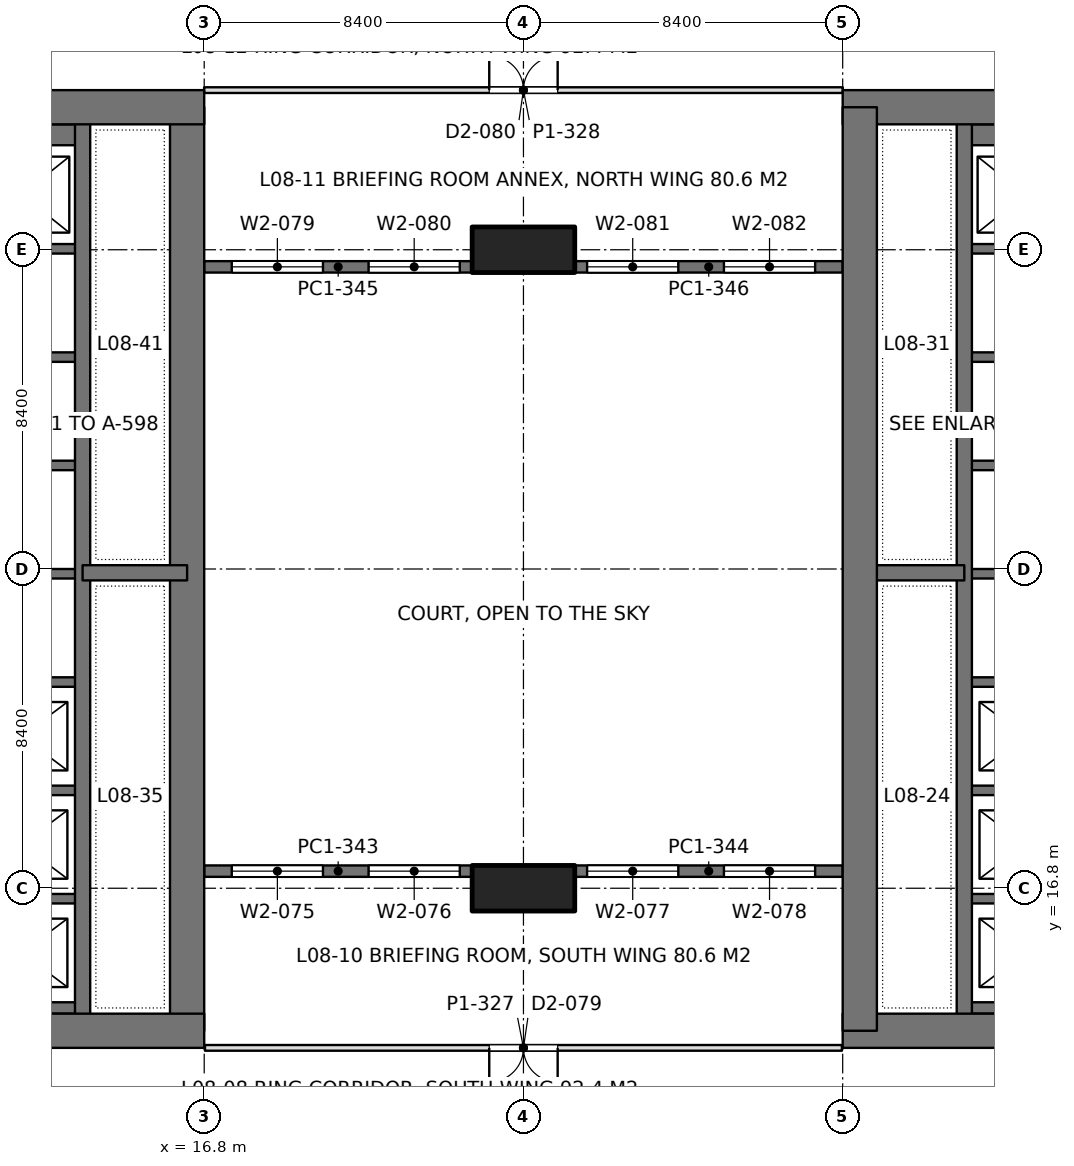
"""IFC4 building model, lengths in metres.
Left out: names, types, materials, properties, quantities, classifications, styles, units other than length and angle.
Written with IfcOpenShell. Run it as: python <this file> out.ifc"""

import sys

from ifc_helpers import new_model, si_unit, direction, frame, frame_2d, origin, origin_2d, place, context, subcontext, project, spatial, rectangle, extrude, element, fill, save


model = new_model("IFC4")
c1 = context("Model", 3, precision=1e-05, world=origin(), true_north=direction((0.0, 1.0)))
c2 = subcontext(c1, "Body", "Model", "MODEL_VIEW")
j1 = project(units=[si_unit("LENGTHUNIT", "METRE"), si_unit("PLANEANGLEUNIT", "RADIAN")], contexts=[c1])
p1 = place(None, origin())
s1 = spatial("IfcSite", under=j1, at=p1, CompositionType="ELEMENT")
p2 = place(p1, origin())
s2 = spatial("IfcBuilding", under=s1, at=p2, CompositionType="ELEMENT")
p3 = place(p2, frame((0.0, 0.0, 36.9)))
s3 = spatial("IfcBuildingStorey", under=s2, at=p3, CompositionType="ELEMENT", Elevation=36.9)
for number, where, z_axis, x_axis in (
    (1, (25.2, 16.8, 0.0), (0.0, 0.0, 1.0), (1.0, 0.0, 0.0)),
    (2, (25.2, 33.6, 0.0), (0.0, 0.0, 1.0), (1.0, 0.0, 0.0)),
):
    element("IfcColumn", number, at=place(p3, frame(where, z_axis=z_axis, x_axis=x_axis)), inside=s3, PredefinedType="COLUMN", context=c2, shape_type="SweptSolid", body=[
        extrude(rectangle(XDim=2.7, YDim=1.2, at=origin_2d()), origin(), (0.0, 0.0, 1.0), 4.5),
    ])
p4 = place(p3, frame((-1.2, 13.05, 0.0), z_axis=(0.0, 0.0, 1.0), x_axis=(1.0, 0.0, 0.0)))
e3 = element("IfcWall", 3, at=p4, inside=s3, PredefinedType="SHEAR", context=c2, shape_type="SweptSolid", body=[
    extrude(rectangle(XDim=18.0, YDim=0.9, at=frame_2d((9.0, 0.0))), origin(), (0.0, 0.0, 1.0), 4.5),
])
p5 = place(p4, frame((8.95, 0.0, 0.0)))
e4 = element("IfcOpeningElement", 4, at=p5, cuts=e3, PredefinedType="OPENING", context=c2, shape_type="SweptSolid", body=[
    extrude(rectangle(XDim=1.8, YDim=2.4, at=frame_2d((0.9, 1.2))), frame((0.0, 0.46, 0.0), z_axis=(0.0, -1.0, 0.0), x_axis=(1.0, 0.0, 0.0)), (0.0, 0.0, 1.0), 0.92),
])
p6 = place(p3, frame((-1.2, 37.35, 0.0), z_axis=(0.0, 0.0, 1.0), x_axis=(1.0, 0.0, 0.0)))
e5 = element("IfcWall", 5, at=p6, inside=s3, PredefinedType="SHEAR", context=c2, shape_type="SweptSolid", body=[
    extrude(rectangle(XDim=18.0, YDim=0.9, at=frame_2d((9.0, 0.0))), origin(), (0.0, 0.0, 1.0), 4.5),
])
p7 = place(p6, frame((8.95, 0.0, 0.0)))
e6 = element("IfcOpeningElement", 6, at=p7, cuts=e5, PredefinedType="OPENING", context=c2, shape_type="SweptSolid", body=[
    extrude(rectangle(XDim=1.8, YDim=2.4, at=frame_2d((0.9, 1.2))), frame((0.0, 0.46, 0.0), z_axis=(0.0, -1.0, 0.0), x_axis=(1.0, 0.0, 0.0)), (0.0, 0.0, 1.0), 0.92),
])
p8 = place(p3, frame((16.35, 13.05, 0.0), z_axis=(0.0, 0.0, 1.0), x_axis=(0.0, 1.0, 0.0)))
e7 = element("IfcWall", 7, at=p8, inside=s3, PredefinedType="SHEAR", context=c2, shape_type="SweptSolid", body=[
    extrude(rectangle(XDim=24.3, YDim=0.9, at=frame_2d((12.15, 0.0))), origin(), (0.0, 0.0, 1.0), 4.5),
])
p9 = place(p3, frame((13.6, 13.05, 0.0), z_axis=(0.0, 0.0, 1.0), x_axis=(0.0, 1.0, 0.0)))
e8 = element("IfcWall", 8, at=p9, inside=s3, PredefinedType="SHEAR", context=c2, shape_type="SweptSolid", body=[
    extrude(rectangle(XDim=24.3, YDim=0.4, at=frame_2d((12.15, 0.0))), origin(), (0.0, 0.0, 1.0), 4.5),
])
p10 = place(p3, frame((13.6, 25.1, 0.0), z_axis=(0.0, 0.0, 1.0), x_axis=(1.0, 0.0, 0.0)))
e9 = element("IfcWall", 9, at=p10, inside=s3, PredefinedType="SHEAR", context=c2, shape_type="SweptSolid", body=[
    extrude(rectangle(XDim=2.75, YDim=0.4, at=frame_2d((1.375, 0.0))), origin(), (0.0, 0.0, 1.0), 4.5),
])
p11 = place(p3, frame((10.4, 13.65, 0.0), z_axis=(0.0, 0.0, 1.0), x_axis=(1.0, 0.0, 0.0)))
e10 = element("IfcWall", 10, at=p11, inside=s3, PredefinedType="SHEAR", context=c2, shape_type="SweptSolid", body=[
    extrude(rectangle(XDim=3.2, YDim=0.3, at=frame_2d((1.6, 0.0))), origin(), (0.0, 0.0, 1.0), 4.5),
])
for number, where, z_axis, x_axis in (
    (11, (10.4, 16.525, 0.0), (0.0, 0.0, 1.0), (1.0, 0.0, 0.0)),
    (12, (10.4, 19.375, 0.0), (0.0, 0.0, 1.0), (1.0, 0.0, 0.0)),
    (13, (10.4, 22.225, 0.0), (0.0, 0.0, 1.0), (1.0, 0.0, 0.0)),
    (14, (10.4, 25.075, 0.0), (0.0, 0.0, 1.0), (1.0, 0.0, 0.0)),
    (15, (10.4, 27.925, 0.0), (0.0, 0.0, 1.0), (1.0, 0.0, 0.0)),
    (16, (10.4, 30.775, 0.0), (0.0, 0.0, 1.0), (1.0, 0.0, 0.0)),
    (17, (10.4, 33.625, 0.0), (0.0, 0.0, 1.0), (1.0, 0.0, 0.0)),
):
    element("IfcWall", number, at=place(p3, frame(where, z_axis=z_axis, x_axis=x_axis)), inside=s3, PredefinedType="SHEAR", context=c2, shape_type="SweptSolid", body=[
        extrude(rectangle(XDim=3.2, YDim=0.25, at=frame_2d((1.6, 0.0))), origin(), (0.0, 0.0, 1.0), 4.5),
    ])
p12 = place(p3, frame((10.4, 36.625, 0.0), z_axis=(0.0, 0.0, 1.0), x_axis=(1.0, 0.0, 0.0)))
e18 = element("IfcWall", 18, at=p12, inside=s3, PredefinedType="SHEAR", context=c2, shape_type="SweptSolid", body=[
    extrude(rectangle(XDim=3.2, YDim=0.55, at=frame_2d((1.6, 0.0))), origin(), (0.0, 0.0, 1.0), 4.5),
])
p13 = place(p3, frame((33.6, 13.05, 0.0), z_axis=(0.0, 0.0, 1.0), x_axis=(1.0, 0.0, 0.0)))
e19 = element("IfcWall", 19, at=p13, inside=s3, PredefinedType="SHEAR", context=c2, shape_type="SweptSolid", body=[
    extrude(rectangle(XDim=18.0, YDim=0.9, at=frame_2d((9.0, 0.0))), origin(), (0.0, 0.0, 1.0), 4.5),
])
p14 = place(p13, frame((7.25, 0.0, 0.0)))
e20 = element("IfcOpeningElement", 20, at=p14, cuts=e19, PredefinedType="OPENING", context=c2, shape_type="SweptSolid", body=[
    extrude(rectangle(XDim=1.8, YDim=2.4, at=frame_2d((0.9, 1.2))), frame((0.0, 0.46, 0.0), z_axis=(0.0, -1.0, 0.0), x_axis=(1.0, 0.0, 0.0)), (0.0, 0.0, 1.0), 0.92),
])
p15 = place(p3, frame((33.6, 37.35, 0.0), z_axis=(0.0, 0.0, 1.0), x_axis=(1.0, 0.0, 0.0)))
e21 = element("IfcWall", 21, at=p15, inside=s3, PredefinedType="SHEAR", context=c2, shape_type="SweptSolid", body=[
    extrude(rectangle(XDim=18.0, YDim=0.9, at=frame_2d((9.0, 0.0))), origin(), (0.0, 0.0, 1.0), 4.5),
])
p16 = place(p15, frame((7.25, 0.0, 0.0)))
e22 = element("IfcOpeningElement", 22, at=p16, cuts=e21, PredefinedType="OPENING", context=c2, shape_type="SweptSolid", body=[
    extrude(rectangle(XDim=1.8, YDim=2.4, at=frame_2d((0.9, 1.2))), frame((0.0, 0.46, 0.0), z_axis=(0.0, -1.0, 0.0), x_axis=(1.0, 0.0, 0.0)), (0.0, 0.0, 1.0), 0.92),
])
p17 = place(p3, frame((34.05, 13.05, 0.0), z_axis=(0.0, 0.0, 1.0), x_axis=(0.0, 1.0, 0.0)))
e23 = element("IfcWall", 23, at=p17, inside=s3, PredefinedType="SHEAR", context=c2, shape_type="SweptSolid", body=[
    extrude(rectangle(XDim=24.3, YDim=0.9, at=frame_2d((12.15, 0.0))), origin(), (0.0, 0.0, 1.0), 4.5),
])
p18 = place(p3, frame((36.8, 13.05, 0.0), z_axis=(0.0, 0.0, 1.0), x_axis=(0.0, 1.0, 0.0)))
e24 = element("IfcWall", 24, at=p18, inside=s3, PredefinedType="SHEAR", context=c2, shape_type="SweptSolid", body=[
    extrude(rectangle(XDim=24.3, YDim=0.4, at=frame_2d((12.15, 0.0))), origin(), (0.0, 0.0, 1.0), 4.5),
])
p19 = place(p3, frame((36.8, 25.1, 0.0), z_axis=(0.0, 0.0, 1.0), x_axis=(-1.0, 0.0, 0.0)))
e25 = element("IfcWall", 25, at=p19, inside=s3, PredefinedType="SHEAR", context=c2, shape_type="SweptSolid", body=[
    extrude(rectangle(XDim=2.75, YDim=0.4, at=frame_2d((1.375, 0.0))), origin(), (0.0, 0.0, 1.0), 4.5),
])
p20 = place(p3, frame((40.0, 13.65, 0.0), z_axis=(0.0, 0.0, 1.0), x_axis=(-1.0, 0.0, 0.0)))
e26 = element("IfcWall", 26, at=p20, inside=s3, PredefinedType="SHEAR", context=c2, shape_type="SweptSolid", body=[
    extrude(rectangle(XDim=3.2, YDim=0.3, at=frame_2d((1.6, 0.0))), origin(), (0.0, 0.0, 1.0), 4.5),
])
for number, where, z_axis, x_axis in (
    (27, (40.0, 16.525, 0.0), (0.0, 0.0, 1.0), (-1.0, 0.0, 0.0)),
    (28, (40.0, 19.375, 0.0), (0.0, 0.0, 1.0), (-1.0, 0.0, 0.0)),
    (29, (40.0, 22.225, 0.0), (0.0, 0.0, 1.0), (-1.0, 0.0, 0.0)),
    (30, (40.0, 25.075, 0.0), (0.0, 0.0, 1.0), (-1.0, 0.0, 0.0)),
    (31, (40.0, 27.925, 0.0), (0.0, 0.0, 1.0), (-1.0, 0.0, 0.0)),
    (32, (40.0, 30.775, 0.0), (0.0, 0.0, 1.0), (-1.0, 0.0, 0.0)),
    (33, (40.0, 33.625, 0.0), (0.0, 0.0, 1.0), (-1.0, 0.0, 0.0)),
):
    element("IfcWall", number, at=place(p3, frame(where, z_axis=z_axis, x_axis=x_axis)), inside=s3, PredefinedType="SHEAR", context=c2, shape_type="SweptSolid", body=[
        extrude(rectangle(XDim=3.2, YDim=0.25, at=frame_2d((1.6, 0.0))), origin(), (0.0, 0.0, 1.0), 4.5),
    ])
p21 = place(p3, frame((40.0, 36.625, 0.0), z_axis=(0.0, 0.0, 1.0), x_axis=(-1.0, 0.0, 0.0)))
e34 = element("IfcWall", 34, at=p21, inside=s3, PredefinedType="SHEAR", context=c2, shape_type="SweptSolid", body=[
    extrude(rectangle(XDim=3.2, YDim=0.55, at=frame_2d((1.6, 0.0))), origin(), (0.0, 0.0, 1.0), 4.5),
])
p22 = place(p3, frame((16.8, 17.25, 0.0), z_axis=(0.0, 0.0, 1.0), x_axis=(1.0, 0.0, 0.0)))
e35 = element("IfcWall", 35, at=p22, inside=s3, PredefinedType="SOLIDWALL", context=c2, shape_type="SweptSolid", body=[
    extrude(rectangle(XDim=7.05, YDim=0.3, at=frame_2d((3.525, 0.0))), origin(), (0.0, 0.0, 1.0), 4.34),
])
p23 = place(p22, frame((0.725, 0.0, 0.9)))
e36 = element("IfcOpeningElement", 36, at=p23, cuts=e35, PredefinedType="OPENING", context=c2, shape_type="SweptSolid", body=[
    extrude(rectangle(XDim=2.4, YDim=1.9, at=frame_2d((1.2, 0.95))), frame((0.0, 0.16, 0.0), z_axis=(0.0, -1.0, 0.0), x_axis=(1.0, 0.0, 0.0)), (0.0, 0.0, 1.0), 0.32),
])
p24 = place(p22, frame((4.325, 0.0, 0.9)))
e37 = element("IfcOpeningElement", 37, at=p24, cuts=e35, PredefinedType="OPENING", context=c2, shape_type="SweptSolid", body=[
    extrude(rectangle(XDim=2.4, YDim=1.9, at=frame_2d((1.2, 0.95))), frame((0.0, 0.16, 0.0), z_axis=(0.0, -1.0, 0.0), x_axis=(1.0, 0.0, 0.0)), (0.0, 0.0, 1.0), 0.32),
])
p25 = place(p3, frame((26.55, 17.25, 0.0), z_axis=(0.0, 0.0, 1.0), x_axis=(1.0, 0.0, 0.0)))
e38 = element("IfcWall", 38, at=p25, inside=s3, PredefinedType="SOLIDWALL", context=c2, shape_type="SweptSolid", body=[
    extrude(rectangle(XDim=7.05, YDim=0.3, at=frame_2d((3.525, 0.0))), origin(), (0.0, 0.0, 1.0), 4.34),
])
p26 = place(p25, frame((0.325, 0.0, 0.9)))
e39 = element("IfcOpeningElement", 39, at=p26, cuts=e38, PredefinedType="OPENING", context=c2, shape_type="SweptSolid", body=[
    extrude(rectangle(XDim=2.4, YDim=1.9, at=frame_2d((1.2, 0.95))), frame((0.0, 0.16, 0.0), z_axis=(0.0, -1.0, 0.0), x_axis=(1.0, 0.0, 0.0)), (0.0, 0.0, 1.0), 0.32),
])
p27 = place(p25, frame((3.925, 0.0, 0.9)))
e40 = element("IfcOpeningElement", 40, at=p27, cuts=e38, PredefinedType="OPENING", context=c2, shape_type="SweptSolid", body=[
    extrude(rectangle(XDim=2.4, YDim=1.9, at=frame_2d((1.2, 0.95))), frame((0.0, 0.16, 0.0), z_axis=(0.0, -1.0, 0.0), x_axis=(1.0, 0.0, 0.0)), (0.0, 0.0, 1.0), 0.32),
])
p28 = place(p3, frame((16.8, 33.15, 0.0), z_axis=(0.0, 0.0, 1.0), x_axis=(1.0, 0.0, 0.0)))
e41 = element("IfcWall", 41, at=p28, inside=s3, PredefinedType="SOLIDWALL", context=c2, shape_type="SweptSolid", body=[
    extrude(rectangle(XDim=7.05, YDim=0.3, at=frame_2d((3.525, 0.0))), origin(), (0.0, 0.0, 1.0), 4.34),
])
p29 = place(p28, frame((0.725, 0.0, 0.9)))
e42 = element("IfcOpeningElement", 42, at=p29, cuts=e41, PredefinedType="OPENING", context=c2, shape_type="SweptSolid", body=[
    extrude(rectangle(XDim=2.4, YDim=1.9, at=frame_2d((1.2, 0.95))), frame((0.0, 0.16, 0.0), z_axis=(0.0, -1.0, 0.0), x_axis=(1.0, 0.0, 0.0)), (0.0, 0.0, 1.0), 0.32),
])
p30 = place(p28, frame((4.325, 0.0, 0.9)))
e43 = element("IfcOpeningElement", 43, at=p30, cuts=e41, PredefinedType="OPENING", context=c2, shape_type="SweptSolid", body=[
    extrude(rectangle(XDim=2.4, YDim=1.9, at=frame_2d((1.2, 0.95))), frame((0.0, 0.16, 0.0), z_axis=(0.0, -1.0, 0.0), x_axis=(1.0, 0.0, 0.0)), (0.0, 0.0, 1.0), 0.32),
])
p31 = place(p3, frame((26.55, 33.15, 0.0), z_axis=(0.0, 0.0, 1.0), x_axis=(1.0, 0.0, 0.0)))
e44 = element("IfcWall", 44, at=p31, inside=s3, PredefinedType="SOLIDWALL", context=c2, shape_type="SweptSolid", body=[
    extrude(rectangle(XDim=7.05, YDim=0.3, at=frame_2d((3.525, 0.0))), origin(), (0.0, 0.0, 1.0), 4.34),
])
p32 = place(p31, frame((0.325, 0.0, 0.9)))
e45 = element("IfcOpeningElement", 45, at=p32, cuts=e44, PredefinedType="OPENING", context=c2, shape_type="SweptSolid", body=[
    extrude(rectangle(XDim=2.4, YDim=1.9, at=frame_2d((1.2, 0.95))), frame((0.0, 0.16, 0.0), z_axis=(0.0, -1.0, 0.0), x_axis=(1.0, 0.0, 0.0)), (0.0, 0.0, 1.0), 0.32),
])
p33 = place(p31, frame((3.925, 0.0, 0.9)))
e46 = element("IfcOpeningElement", 46, at=p33, cuts=e44, PredefinedType="OPENING", context=c2, shape_type="SweptSolid", body=[
    extrude(rectangle(XDim=2.4, YDim=1.9, at=frame_2d((1.2, 0.95))), frame((0.0, 0.16, 0.0), z_axis=(0.0, -1.0, 0.0), x_axis=(1.0, 0.0, 0.0)), (0.0, 0.0, 1.0), 0.32),
])
p34 = place(p3, frame((16.82, 12.6, 0.0), z_axis=(0.0, 0.0, 1.0), x_axis=(1.0, 0.0, 0.0)))
e47 = element("IfcWall", 47, at=p34, inside=s3, PredefinedType="PARTITIONING", context=c2, shape_type="SweptSolid", body=[
    extrude(rectangle(XDim=16.76, YDim=0.15, at=frame_2d((8.38, 0.0))), origin(), (0.0, 0.0, 1.0), 3.74),
])
p35 = place(p34, frame((7.48, 0.0, 0.0)))
e48 = element("IfcOpeningElement", 48, at=p35, cuts=e47, PredefinedType="OPENING", context=c2, shape_type="SweptSolid", body=[
    extrude(rectangle(XDim=1.8, YDim=2.2, at=frame_2d((0.9, 1.1))), frame((0.0, 0.085, 0.0), z_axis=(0.0, -1.0, 0.0), x_axis=(1.0, 0.0, 0.0)), (0.0, 0.0, 1.0), 0.17),
])
p36 = place(p3, frame((16.798, 37.8, 0.0), z_axis=(0.0, 0.0, 1.0), x_axis=(1.0, 0.0, 0.0)))
e49 = element("IfcWall", 49, at=p36, inside=s3, PredefinedType="PARTITIONING", context=c2, shape_type="SweptSolid", body=[
    extrude(rectangle(XDim=16.804, YDim=0.15, at=frame_2d((8.402, 0.0))), origin(), (0.0, 0.0, 1.0), 3.74),
])
p37 = place(p36, frame((7.502, 0.0, 0.0)))
e50 = element("IfcOpeningElement", 50, at=p37, cuts=e49, PredefinedType="OPENING", context=c2, shape_type="SweptSolid", body=[
    extrude(rectangle(XDim=1.8, YDim=2.2, at=frame_2d((0.9, 1.1))), frame((0.0, 0.085, 0.0), z_axis=(0.0, -1.0, 0.0), x_axis=(1.0, 0.0, 0.0)), (0.0, 0.0, 1.0), 0.17),
])
p38 = place(p23, origin())
e51 = element("IfcWindow", 51, at=p38, inside=s3, PartitioningType="SINGLE_PANEL", PredefinedType="WINDOW", context=c2, shape_type="SweptSolid", body=[
    extrude(rectangle(XDim=2.4, YDim=1.9, at=frame_2d((1.2, 0.95))), frame((0.0, 0.03, 0.0), z_axis=(0.0, -1.0, 0.0), x_axis=(1.0, 0.0, 0.0)), (0.0, 0.0, 1.0), 0.06),
])
fill(e36, e51)
p39 = place(p24, origin())
e52 = element("IfcWindow", 52, at=p39, inside=s3, PartitioningType="SINGLE_PANEL", PredefinedType="WINDOW", context=c2, shape_type="SweptSolid", body=[
    extrude(rectangle(XDim=2.4, YDim=1.9, at=frame_2d((1.2, 0.95))), frame((0.0, 0.03, 0.0), z_axis=(0.0, -1.0, 0.0), x_axis=(1.0, 0.0, 0.0)), (0.0, 0.0, 1.0), 0.06),
])
fill(e37, e52)
p40 = place(p26, origin())
e53 = element("IfcWindow", 53, at=p40, inside=s3, PartitioningType="SINGLE_PANEL", PredefinedType="WINDOW", context=c2, shape_type="SweptSolid", body=[
    extrude(rectangle(XDim=2.4, YDim=1.9, at=frame_2d((1.2, 0.95))), frame((0.0, 0.03, 0.0), z_axis=(0.0, -1.0, 0.0), x_axis=(1.0, 0.0, 0.0)), (0.0, 0.0, 1.0), 0.06),
])
fill(e39, e53)
p41 = place(p27, origin())
e54 = element("IfcWindow", 54, at=p41, inside=s3, PartitioningType="SINGLE_PANEL", PredefinedType="WINDOW", context=c2, shape_type="SweptSolid", body=[
    extrude(rectangle(XDim=2.4, YDim=1.9, at=frame_2d((1.2, 0.95))), frame((0.0, 0.03, 0.0), z_axis=(0.0, -1.0, 0.0), x_axis=(1.0, 0.0, 0.0)), (0.0, 0.0, 1.0), 0.06),
])
fill(e40, e54)
p42 = place(p29, origin())
e55 = element("IfcWindow", 55, at=p42, inside=s3, PartitioningType="SINGLE_PANEL", PredefinedType="WINDOW", context=c2, shape_type="SweptSolid", body=[
    extrude(rectangle(XDim=2.4, YDim=1.9, at=frame_2d((1.2, 0.95))), frame((0.0, 0.03, 0.0), z_axis=(0.0, -1.0, 0.0), x_axis=(1.0, 0.0, 0.0)), (0.0, 0.0, 1.0), 0.06),
])
fill(e42, e55)
p43 = place(p30, origin())
e56 = element("IfcWindow", 56, at=p43, inside=s3, PartitioningType="SINGLE_PANEL", PredefinedType="WINDOW", context=c2, shape_type="SweptSolid", body=[
    extrude(rectangle(XDim=2.4, YDim=1.9, at=frame_2d((1.2, 0.95))), frame((0.0, 0.03, 0.0), z_axis=(0.0, -1.0, 0.0), x_axis=(1.0, 0.0, 0.0)), (0.0, 0.0, 1.0), 0.06),
])
fill(e43, e56)
p44 = place(p32, origin())
e57 = element("IfcWindow", 57, at=p44, inside=s3, PartitioningType="SINGLE_PANEL", PredefinedType="WINDOW", context=c2, shape_type="SweptSolid", body=[
    extrude(rectangle(XDim=2.4, YDim=1.9, at=frame_2d((1.2, 0.95))), frame((0.0, 0.03, 0.0), z_axis=(0.0, -1.0, 0.0), x_axis=(1.0, 0.0, 0.0)), (0.0, 0.0, 1.0), 0.06),
])
fill(e45, e57)
p45 = place(p33, origin())
e58 = element("IfcWindow", 58, at=p45, inside=s3, PartitioningType="SINGLE_PANEL", PredefinedType="WINDOW", context=c2, shape_type="SweptSolid", body=[
    extrude(rectangle(XDim=2.4, YDim=1.9, at=frame_2d((1.2, 0.95))), frame((0.0, 0.03, 0.0), z_axis=(0.0, -1.0, 0.0), x_axis=(1.0, 0.0, 0.0)), (0.0, 0.0, 1.0), 0.06),
])
fill(e46, e58)
p46 = place(p35, frame((1.8, 0.0, 0.0), z_axis=(0.0, 0.0, 1.0), x_axis=(-1.0, 0.0, 0.0)))
e59 = element("IfcDoor", 59, at=p46, inside=s3, OperationType="DOUBLE_DOOR_SINGLE_SWING", PredefinedType="DOOR", context=c2, shape_type="SweptSolid", body=[
    extrude(rectangle(XDim=1.8, YDim=2.2, at=frame_2d((0.9, 1.1))), frame((0.0, 0.025, 0.0), z_axis=(0.0, -1.0, 0.0), x_axis=(1.0, 0.0, 0.0)), (0.0, 0.0, 1.0), 0.05),
])
fill(e48, e59)
p47 = place(p37, origin())
e60 = element("IfcDoor", 60, at=p47, inside=s3, OperationType="DOUBLE_DOOR_SINGLE_SWING", PredefinedType="DOOR", context=c2, shape_type="SweptSolid", body=[
    extrude(rectangle(XDim=1.8, YDim=2.2, at=frame_2d((0.9, 1.1))), frame((0.0, 0.025, 0.0), z_axis=(0.0, -1.0, 0.0), x_axis=(1.0, 0.0, 0.0)), (0.0, 0.0, 1.0), 0.05),
])
fill(e50, e60)
save(model, sys.argv[1])
